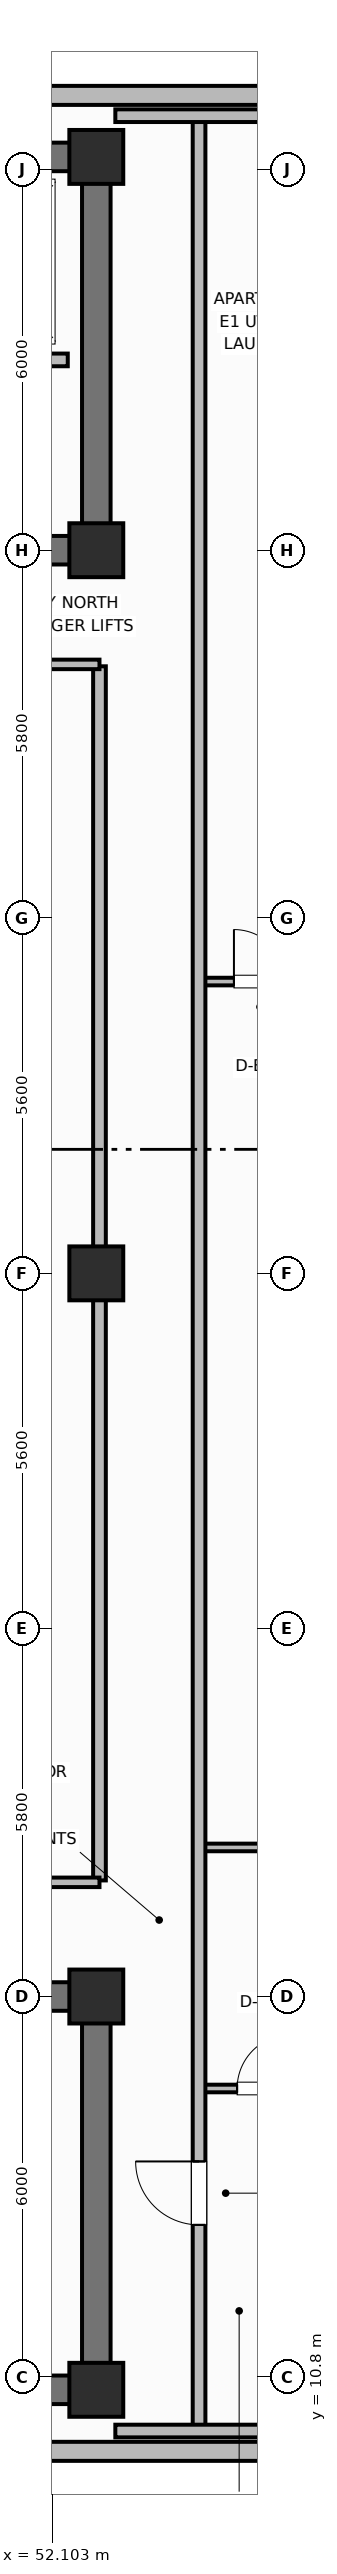
"""IFC4 building model, lengths in metres.
Left out: names, types, materials, properties, quantities, classifications, styles, units other than length and angle.
Written with IfcOpenShell. Run it as: python <this file> out.ifc"""

import sys

from ifc_helpers import new_model, si_unit, direction, frame, frame_2d, origin, origin_2d, place, context, subcontext, project, spatial, rectangle, extrude, element, fill, save


model = new_model("IFC4")
c1 = context("Model", 3, precision=1e-05, world=origin(), true_north=direction((0.0, 1.0)))
c2 = subcontext(c1, "Body", "Model", "MODEL_VIEW")
j1 = project(units=[si_unit("LENGTHUNIT", "METRE"), si_unit("PLANEANGLEUNIT", "RADIAN")], contexts=[c1])
p1 = place(None, origin())
s1 = spatial("IfcSite", under=j1, at=p1, CompositionType="ELEMENT")
p2 = place(p1, origin())
s2 = spatial("IfcBuilding", under=s1, at=p2, CompositionType="ELEMENT")
p3 = place(p2, frame((0.0, 0.0, 248.0)))
s3 = spatial("IfcBuildingStorey", under=s2, at=p3, CompositionType="ELEMENT", Elevation=248.0)
p4 = place(p3, frame((52.8, 10.6, 0.0), z_axis=(0.0, 0.0, 1.0), x_axis=(-1.0, 0.0, 0.0)))
e1 = element("IfcWall", 1, at=p4, inside=s3, PredefinedType="SHEAR", context=c2, shape_type="SweptSolid", body=[
    extrude(rectangle(XDim=27.2, YDim=0.45, at=frame_2d((13.6, 0.0))), origin(), (0.0, 0.0, 1.0), 3.7),
])
p5 = place(p3, frame((52.8, 10.825, 0.0), z_axis=(0.0, 0.0, 1.0), x_axis=(0.0, 1.0, 0.0)))
e2 = element("IfcWall", 2, at=p5, inside=s3, PredefinedType="SHEAR", context=c2, shape_type="SweptSolid", body=[
    extrude(rectangle(XDim=5.75, YDim=0.45, at=frame_2d((2.875, 0.0))), origin(), (0.0, 0.0, 1.0), 3.7),
])
p6 = place(p3, frame((25.6, 16.8, 0.0), z_axis=(0.0, 0.0, 1.0), x_axis=(1.0, 0.0, 0.0)))
e3 = element("IfcWall", 3, at=p6, inside=s3, PredefinedType="SHEAR", context=c2, shape_type="SweptSolid", body=[
    extrude(rectangle(XDim=27.2, YDim=0.45, at=frame_2d((13.6, 0.0))), origin(), (0.0, 0.0, 1.0), 3.7),
])
p7 = place(p6, frame((1.8, 0.0, 0.0)))
e4 = element("IfcOpeningElement", 4, at=p7, cuts=e3, PredefinedType="OPENING", context=c2, shape_type="SweptSolid", body=[
    extrude(rectangle(XDim=1.1, YDim=2.15, at=frame_2d((0.55, 1.075))), frame((0.0, 0.235, 0.0), z_axis=(0.0, -1.0, 0.0), x_axis=(1.0, 0.0, 0.0)), (0.0, 0.0, 1.0), 0.47),
])
p8 = place(p6, frame((5.6, 0.0, 0.0)))
e5 = element("IfcOpeningElement", 5, at=p8, cuts=e3, PredefinedType="OPENING", context=c2, shape_type="SweptSolid", body=[
    extrude(rectangle(XDim=0.85, YDim=2.1, at=frame_2d((0.425, 1.05))), frame((0.0, 0.235, 0.0), z_axis=(0.0, -1.0, 0.0), x_axis=(1.0, 0.0, 0.0)), (0.0, 0.0, 1.0), 0.47),
])
p9 = place(p6, frame((13.0, 0.0, 0.0)))
e6 = element("IfcOpeningElement", 6, at=p9, cuts=e3, PredefinedType="OPENING", context=c2, shape_type="SweptSolid", body=[
    extrude(rectangle(XDim=1.2, YDim=2.15, at=frame_2d((0.6, 1.075))), frame((0.0, 0.235, 0.0), z_axis=(0.0, -1.0, 0.0), x_axis=(1.0, 0.0, 0.0)), (0.0, 0.0, 1.0), 0.47),
])
p10 = place(p6, frame((19.2, 0.0, 0.0)))
e7 = element("IfcOpeningElement", 7, at=p10, cuts=e3, PredefinedType="OPENING", context=c2, shape_type="SweptSolid", body=[
    extrude(rectangle(XDim=0.85, YDim=2.1, at=frame_2d((0.425, 1.05))), frame((0.0, 0.235, 0.0), z_axis=(0.0, -1.0, 0.0), x_axis=(1.0, 0.0, 0.0)), (0.0, 0.0, 1.0), 0.47),
])
p11 = place(p6, frame((23.8, 0.0, 0.0)))
e8 = element("IfcOpeningElement", 8, at=p11, cuts=e3, PredefinedType="OPENING", context=c2, shape_type="SweptSolid", body=[
    extrude(rectangle(XDim=0.9, YDim=2.1, at=frame_2d((0.45, 1.05))), frame((0.0, 0.235, 0.0), z_axis=(0.0, -1.0, 0.0), x_axis=(1.0, 0.0, 0.0)), (0.0, 0.0, 1.0), 0.47),
])
p12 = place(p3, frame((25.6, 45.8, 0.0), z_axis=(0.0, 0.0, 1.0), x_axis=(1.0, 0.0, 0.0)))
e9 = element("IfcWall", 9, at=p12, inside=s3, PredefinedType="SHEAR", context=c2, shape_type="SweptSolid", body=[
    extrude(rectangle(XDim=27.2, YDim=0.45, at=frame_2d((13.6, 0.0))), origin(), (0.0, 0.0, 1.0), 3.7),
])
p13 = place(p3, frame((52.8, 39.825, 0.0), z_axis=(0.0, 0.0, 1.0), x_axis=(0.0, 1.0, 0.0)))
e10 = element("IfcWall", 10, at=p13, inside=s3, PredefinedType="SHEAR", context=c2, shape_type="SweptSolid", body=[
    extrude(rectangle(XDim=5.75, YDim=0.45, at=frame_2d((2.875, 0.0))), origin(), (0.0, 0.0, 1.0), 3.7),
])
p14 = place(p3, frame((52.8, 39.6, 0.0), z_axis=(0.0, 0.0, 1.0), x_axis=(-1.0, 0.0, 0.0)))
e11 = element("IfcWall", 11, at=p14, inside=s3, PredefinedType="SHEAR", context=c2, shape_type="SweptSolid", body=[
    extrude(rectangle(XDim=27.2, YDim=0.45, at=frame_2d((13.6, 0.0))), origin(), (0.0, 0.0, 1.0), 3.7),
])
p15 = place(p14, frame((24.2, 0.0, 0.0)))
e12 = element("IfcOpeningElement", 12, at=p15, cuts=e11, PredefinedType="OPENING", context=c2, shape_type="SweptSolid", body=[
    extrude(rectangle(XDim=1.1, YDim=2.15, at=frame_2d((0.55, 1.075))), frame((0.0, 0.235, 0.0), z_axis=(0.0, -1.0, 0.0), x_axis=(1.0, 0.0, 0.0)), (0.0, 0.0, 1.0), 0.47),
])
p16 = place(p14, frame((20.55, 0.0, 0.0)))
e13 = element("IfcOpeningElement", 13, at=p16, cuts=e11, PredefinedType="OPENING", context=c2, shape_type="SweptSolid", body=[
    extrude(rectangle(XDim=0.95, YDim=2.1, at=frame_2d((0.475, 1.05))), frame((0.0, 0.235, 0.0), z_axis=(0.0, -1.0, 0.0), x_axis=(1.0, 0.0, 0.0)), (0.0, 0.0, 1.0), 0.47),
])
p17 = place(p14, frame((15.1, 0.0, 0.0)))
e14 = element("IfcOpeningElement", 14, at=p17, cuts=e11, PredefinedType="OPENING", context=c2, shape_type="SweptSolid", body=[
    extrude(rectangle(XDim=1.2, YDim=2.15, at=frame_2d((0.6, 1.075))), frame((0.0, 0.235, 0.0), z_axis=(0.0, -1.0, 0.0), x_axis=(1.0, 0.0, 0.0)), (0.0, 0.0, 1.0), 0.47),
])
p18 = place(p14, frame((13.05, 0.0, 0.0)))
e15 = element("IfcOpeningElement", 15, at=p18, cuts=e11, PredefinedType="OPENING", context=c2, shape_type="SweptSolid", body=[
    extrude(rectangle(XDim=0.85, YDim=2.1, at=frame_2d((0.425, 1.05))), frame((0.0, 0.235, 0.0), z_axis=(0.0, -1.0, 0.0), x_axis=(1.0, 0.0, 0.0)), (0.0, 0.0, 1.0), 0.47),
])
p19 = place(p14, frame((11.0, 0.0, 0.0)))
e16 = element("IfcOpeningElement", 16, at=p19, cuts=e11, PredefinedType="OPENING", context=c2, shape_type="SweptSolid", body=[
    extrude(rectangle(XDim=0.85, YDim=2.1, at=frame_2d((0.425, 1.05))), frame((0.0, 0.235, 0.0), z_axis=(0.0, -1.0, 0.0), x_axis=(1.0, 0.0, 0.0)), (0.0, 0.0, 1.0), 0.47),
])
p20 = place(p14, frame((7.35, 0.0, 0.0)))
e17 = element("IfcOpeningElement", 17, at=p20, cuts=e11, PredefinedType="OPENING", context=c2, shape_type="SweptSolid", body=[
    extrude(rectangle(XDim=0.85, YDim=2.1, at=frame_2d((0.425, 1.05))), frame((0.0, 0.235, 0.0), z_axis=(0.0, -1.0, 0.0), x_axis=(1.0, 0.0, 0.0)), (0.0, 0.0, 1.0), 0.47),
])
p21 = place(p14, frame((4.2, 0.0, 0.0)))
e18 = element("IfcOpeningElement", 18, at=p21, cuts=e11, PredefinedType="OPENING", context=c2, shape_type="SweptSolid", body=[
    extrude(rectangle(XDim=1.3, YDim=2.2, at=frame_2d((0.65, 1.1))), frame((0.0, 0.235, 0.0), z_axis=(0.0, -1.0, 0.0), x_axis=(1.0, 0.0, 0.0)), (0.0, 0.0, 1.0), 0.47),
])
for number, where, z_axis, x_axis in (
    (19, (52.8, 10.6, 0.0), (0.0, 0.0, 1.0), (1.0, 0.0, 0.0)),
    (20, (52.8, 16.8, 0.0), (0.0, 0.0, 1.0), (1.0, 0.0, 0.0)),
    (21, (52.8, 39.6, 0.0), (0.0, 0.0, 1.0), (1.0, 0.0, 0.0)),
    (22, (52.8, 45.8, 0.0), (0.0, 0.0, 1.0), (1.0, 0.0, 0.0)),
    (23, (52.8, 28.2, 0.0), (0.0, 0.0, 1.0), (1.0, 0.0, 0.0)),
):
    element("IfcColumn", number, at=place(p3, frame(where, z_axis=z_axis, x_axis=x_axis)), inside=s3, PredefinedType="COLUMN", context=c2, shape_type="SweptSolid", body=[
        extrude(rectangle(XDim=0.85, YDim=0.85, at=origin_2d()), origin(), (0.0, 0.0, 1.0), 3.7),
    ])
p22 = place(p3, frame((22.56, 9.63, 0.0), z_axis=(0.0, 0.0, 1.0), x_axis=(1.0, 0.0, 0.0)))
e24 = element("IfcWall", 24, at=p22, inside=s3, PredefinedType="SOLIDWALL", context=c2, shape_type="SweptSolid", body=[
    extrude(rectangle(XDim=33.28, YDim=0.3, at=frame_2d((16.64, 0.0))), origin(), (0.0, 0.0, 1.0), 2.73),
])
p23 = place(p22, frame((4.311, 0.0, 0.76)))
e25 = element("IfcOpeningElement", 25, at=p23, cuts=e24, PredefinedType="OPENING", context=c2, shape_type="SweptSolid", body=[
    extrude(rectangle(XDim=1.4, YDim=1.85, at=frame_2d((0.7, 0.925))), frame((0.0, 0.16, 0.0), z_axis=(0.0, -1.0, 0.0), x_axis=(1.0, 0.0, 0.0)), (0.0, 0.0, 1.0), 0.32),
])
p24 = place(p22, frame((7.218, 0.0, 0.76)))
e26 = element("IfcOpeningElement", 26, at=p24, cuts=e24, PredefinedType="OPENING", context=c2, shape_type="SweptSolid", body=[
    extrude(rectangle(XDim=1.4, YDim=1.85, at=frame_2d((0.7, 0.925))), frame((0.0, 0.16, 0.0), z_axis=(0.0, -1.0, 0.0), x_axis=(1.0, 0.0, 0.0)), (0.0, 0.0, 1.0), 0.32),
])
p25 = place(p22, frame((9.775, 0.0, 0.76)))
e27 = element("IfcOpeningElement", 27, at=p25, cuts=e24, PredefinedType="OPENING", context=c2, shape_type="SweptSolid", body=[
    extrude(rectangle(XDim=1.4, YDim=1.85, at=frame_2d((0.7, 0.925))), frame((0.0, 0.16, 0.0), z_axis=(0.0, -1.0, 0.0), x_axis=(1.0, 0.0, 0.0)), (0.0, 0.0, 1.0), 0.32),
])
p26 = place(p22, frame((14.083, 0.0, 0.76)))
e28 = element("IfcOpeningElement", 28, at=p26, cuts=e24, PredefinedType="OPENING", context=c2, shape_type="SweptSolid", body=[
    extrude(rectangle(XDim=1.4, YDim=1.85, at=frame_2d((0.7, 0.925))), frame((0.0, 0.16, 0.0), z_axis=(0.0, -1.0, 0.0), x_axis=(1.0, 0.0, 0.0)), (0.0, 0.0, 1.0), 0.32),
])
p27 = place(p22, frame((15.94, 0.0, 0.76)))
e29 = element("IfcOpeningElement", 29, at=p27, cuts=e24, PredefinedType="OPENING", context=c2, shape_type="SweptSolid", body=[
    extrude(rectangle(XDim=1.4, YDim=1.85, at=frame_2d((0.7, 0.925))), frame((0.0, 0.16, 0.0), z_axis=(0.0, -1.0, 0.0), x_axis=(1.0, 0.0, 0.0)), (0.0, 0.0, 1.0), 0.32),
])
p28 = place(p22, frame((17.797, 0.0, 0.76)))
e30 = element("IfcOpeningElement", 30, at=p28, cuts=e24, PredefinedType="OPENING", context=c2, shape_type="SweptSolid", body=[
    extrude(rectangle(XDim=1.4, YDim=1.85, at=frame_2d((0.7, 0.925))), frame((0.0, 0.16, 0.0), z_axis=(0.0, -1.0, 0.0), x_axis=(1.0, 0.0, 0.0)), (0.0, 0.0, 1.0), 0.32),
])
p29 = place(p22, frame((22.104, 0.0, 0.76)))
e31 = element("IfcOpeningElement", 31, at=p29, cuts=e24, PredefinedType="OPENING", context=c2, shape_type="SweptSolid", body=[
    extrude(rectangle(XDim=1.4, YDim=1.85, at=frame_2d((0.7, 0.925))), frame((0.0, 0.16, 0.0), z_axis=(0.0, -1.0, 0.0), x_axis=(1.0, 0.0, 0.0)), (0.0, 0.0, 1.0), 0.32),
])
p30 = place(p22, frame((24.662, 0.0, 0.76)))
e32 = element("IfcOpeningElement", 32, at=p30, cuts=e24, PredefinedType="OPENING", context=c2, shape_type="SweptSolid", body=[
    extrude(rectangle(XDim=1.4, YDim=1.85, at=frame_2d((0.7, 0.925))), frame((0.0, 0.16, 0.0), z_axis=(0.0, -1.0, 0.0), x_axis=(1.0, 0.0, 0.0)), (0.0, 0.0, 1.0), 0.32),
])
p31 = place(p22, frame((27.569, 0.0, 0.76)))
e33 = element("IfcOpeningElement", 33, at=p31, cuts=e24, PredefinedType="OPENING", context=c2, shape_type="SweptSolid", body=[
    extrude(rectangle(XDim=1.4, YDim=1.85, at=frame_2d((0.7, 0.925))), frame((0.0, 0.16, 0.0), z_axis=(0.0, -1.0, 0.0), x_axis=(1.0, 0.0, 0.0)), (0.0, 0.0, 1.0), 0.32),
])
p32 = place(p3, frame((55.84, 46.77, 0.0), z_axis=(0.0, 0.0, 1.0), x_axis=(-1.0, 0.0, 0.0)))
e34 = element("IfcWall", 34, at=p32, inside=s3, PredefinedType="SOLIDWALL", context=c2, shape_type="SweptSolid", body=[
    extrude(rectangle(XDim=33.28, YDim=0.3, at=frame_2d((16.64, 0.0))), origin(), (0.0, 0.0, 1.0), 2.73),
])
p33 = place(p32, frame((4.547, 0.0, 0.76)))
e35 = element("IfcOpeningElement", 35, at=p33, cuts=e34, PredefinedType="OPENING", context=c2, shape_type="SweptSolid", body=[
    extrude(rectangle(XDim=1.8, YDim=1.85, at=frame_2d((0.9, 0.925))), frame((0.0, 0.16, 0.0), z_axis=(0.0, -1.0, 0.0), x_axis=(1.0, 0.0, 0.0)), (0.0, 0.0, 1.0), 0.32),
])
p34 = place(p32, frame((7.745, 0.0, 0.76)))
e36 = element("IfcOpeningElement", 36, at=p34, cuts=e34, PredefinedType="OPENING", context=c2, shape_type="SweptSolid", body=[
    extrude(rectangle(XDim=1.8, YDim=1.85, at=frame_2d((0.9, 0.925))), frame((0.0, 0.16, 0.0), z_axis=(0.0, -1.0, 0.0), x_axis=(1.0, 0.0, 0.0)), (0.0, 0.0, 1.0), 0.32),
])
p35 = place(p32, frame((14.141, 0.0, 0.76)))
e37 = element("IfcOpeningElement", 37, at=p35, cuts=e34, PredefinedType="OPENING", context=c2, shape_type="SweptSolid", body=[
    extrude(rectangle(XDim=1.8, YDim=1.85, at=frame_2d((0.9, 0.925))), frame((0.0, 0.16, 0.0), z_axis=(0.0, -1.0, 0.0), x_axis=(1.0, 0.0, 0.0)), (0.0, 0.0, 1.0), 0.32),
])
p36 = place(p32, frame((17.339, 0.0, 0.76)))
e38 = element("IfcOpeningElement", 38, at=p36, cuts=e34, PredefinedType="OPENING", context=c2, shape_type="SweptSolid", body=[
    extrude(rectangle(XDim=1.8, YDim=1.85, at=frame_2d((0.9, 0.925))), frame((0.0, 0.16, 0.0), z_axis=(0.0, -1.0, 0.0), x_axis=(1.0, 0.0, 0.0)), (0.0, 0.0, 1.0), 0.32),
])
p37 = place(p32, frame((23.735, 0.0, 0.76)))
e39 = element("IfcOpeningElement", 39, at=p37, cuts=e34, PredefinedType="OPENING", context=c2, shape_type="SweptSolid", body=[
    extrude(rectangle(XDim=1.8, YDim=1.85, at=frame_2d((0.9, 0.925))), frame((0.0, 0.16, 0.0), z_axis=(0.0, -1.0, 0.0), x_axis=(1.0, 0.0, 0.0)), (0.0, 0.0, 1.0), 0.32),
])
p38 = place(p32, frame((26.933, 0.0, 0.76)))
e40 = element("IfcOpeningElement", 40, at=p38, cuts=e34, PredefinedType="OPENING", context=c2, shape_type="SweptSolid", body=[
    extrude(rectangle(XDim=1.8, YDim=1.85, at=frame_2d((0.9, 0.925))), frame((0.0, 0.16, 0.0), z_axis=(0.0, -1.0, 0.0), x_axis=(1.0, 0.0, 0.0)), (0.0, 0.0, 1.0), 0.32),
])
p39 = place(p3, frame((52.35, 42.6, 0.0), z_axis=(0.0, 0.0, 1.0), x_axis=(-1.0, 0.0, 0.0)))
e41 = element("IfcWall", 41, at=p39, inside=s3, PredefinedType="PARTITIONING", context=c2, shape_type="SweptSolid", body=[
    extrude(rectangle(XDim=6.5, YDim=0.2, at=frame_2d((3.25, 0.0))), origin(), (0.0, 0.0, 1.0), 2.56),
])
p40 = place(p39, frame((4.9, 0.0, 0.0)))
e42 = element("IfcOpeningElement", 42, at=p40, cuts=e41, PredefinedType="OPENING", context=c2, shape_type="SweptSolid", body=[
    extrude(rectangle(XDim=1.0, YDim=2.15, at=frame_2d((0.5, 1.075))), frame((0.0, 0.11, 0.0), z_axis=(0.0, -1.0, 0.0), x_axis=(1.0, 0.0, 0.0)), (0.0, 0.0, 1.0), 0.22),
])
p41 = place(p39, frame((2.8, 0.0, 0.0)))
e43 = element("IfcOpeningElement", 43, at=p41, cuts=e41, PredefinedType="OPENING", context=c2, shape_type="SweptSolid", body=[
    extrude(rectangle(XDim=1.0, YDim=2.15, at=frame_2d((0.5, 1.075))), frame((0.0, 0.11, 0.0), z_axis=(0.0, -1.0, 0.0), x_axis=(1.0, 0.0, 0.0)), (0.0, 0.0, 1.0), 0.22),
])
p42 = place(p39, frame((0.7, 0.0, 0.0)))
e44 = element("IfcOpeningElement", 44, at=p42, cuts=e41, PredefinedType="OPENING", context=c2, shape_type="SweptSolid", body=[
    extrude(rectangle(XDim=1.0, YDim=2.15, at=frame_2d((0.5, 1.075))), frame((0.0, 0.11, 0.0), z_axis=(0.0, -1.0, 0.0), x_axis=(1.0, 0.0, 0.0)), (0.0, 0.0, 1.0), 0.22),
])
p43 = place(p3, frame((52.85, 18.63, 0.0), z_axis=(0.0, 0.0, 1.0), x_axis=(0.0, 1.0, 0.0)))
e45 = element("IfcWall", 45, at=p43, inside=s3, PredefinedType="PARTITIONING", context=c2, shape_type="SweptSolid", body=[
    extrude(rectangle(XDim=19.14, YDim=0.2, at=frame_2d((9.57, 0.0))), origin(), (0.0, 0.0, 1.0), 2.56),
])
for number, where, z_axis, x_axis in (
    (46, (30.7, 18.6, 0.0), (0.0, 0.0, 1.0), (1.0, 0.0, 0.0)),
    (47, (30.7, 37.8, 0.0), (0.0, 0.0, 1.0), (1.0, 0.0, 0.0)),
):
    element("IfcWall", number, at=place(p3, frame(where, z_axis=z_axis, x_axis=x_axis)), inside=s3, PredefinedType="PARTITIONING", context=c2, shape_type="SweptSolid", body=[
        extrude(rectangle(XDim=22.15, YDim=0.15, at=frame_2d((11.075, 0.0))), origin(), (0.0, 0.0, 1.0), 2.56),
    ])
p44 = place(p3, frame((54.42, 15.35, 0.0), z_axis=(0.0, 0.0, 1.0), x_axis=(1.0, 0.0, 0.0)))
e48 = element("IfcWall", 48, at=p44, inside=s3, PredefinedType="PARTITIONING", context=c2, shape_type="SweptSolid", body=[
    extrude(rectangle(XDim=1.95, YDim=0.12, at=frame_2d((0.975, 0.0))), origin(), (0.0, 0.0, 1.0), 2.56),
])
p45 = place(p44, frame((0.6, 0.0, 0.0)))
e49 = element("IfcOpeningElement", 49, at=p45, cuts=e48, PredefinedType="OPENING", context=c2, shape_type="SweptSolid", body=[
    extrude(rectangle(XDim=0.85, YDim=2.1, at=frame_2d((0.425, 1.05))), frame((0.0, 0.07, 0.0), z_axis=(0.0, -1.0, 0.0), x_axis=(1.0, 0.0, 0.0)), (0.0, 0.0, 1.0), 0.14),
])
p46 = place(p3, frame((54.42, 19.15, 0.0), z_axis=(0.0, 0.0, 1.0), x_axis=(1.0, 0.0, 0.0)))
e50 = element("IfcWall", 50, at=p46, inside=s3, PredefinedType="PARTITIONING", context=c2, shape_type="SweptSolid", body=[
    extrude(rectangle(XDim=1.95, YDim=0.12, at=frame_2d((0.975, 0.0))), origin(), (0.0, 0.0, 1.0), 2.56),
])
p47 = place(p3, frame((54.42, 32.8, 0.0), z_axis=(0.0, 0.0, 1.0), x_axis=(1.0, 0.0, 0.0)))
e51 = element("IfcWall", 51, at=p47, inside=s3, PredefinedType="PARTITIONING", context=c2, shape_type="SweptSolid", body=[
    extrude(rectangle(XDim=1.95, YDim=0.12, at=frame_2d((0.975, 0.0))), origin(), (0.0, 0.0, 1.0), 2.56),
])
p48 = place(p47, frame((0.55, 0.0, 0.0)))
e52 = element("IfcOpeningElement", 52, at=p48, cuts=e51, PredefinedType="OPENING", context=c2, shape_type="SweptSolid", body=[
    extrude(rectangle(XDim=0.82, YDim=2.08, at=frame_2d((0.41, 1.04))), frame((0.0, 0.07, 0.0), z_axis=(0.0, -1.0, 0.0), x_axis=(1.0, 0.0, 0.0)), (0.0, 0.0, 1.0), 0.14),
])
p49 = place(p3, frame((54.42, 9.95, 0.0), z_axis=(0.0, 0.0, 1.0), x_axis=(0.0, 1.0, 0.0)))
e53 = element("IfcWall", 53, at=p49, inside=s3, PredefinedType="PARTITIONING", context=c2, shape_type="SweptSolid", body=[
    extrude(rectangle(XDim=36.5, YDim=0.2, at=frame_2d((18.25, 0.0))), origin(), (0.0, 0.0, 1.0), 2.56),
])
p50 = place(p49, frame((3.25, 0.0, 0.0)))
e54 = element("IfcOpeningElement", 54, at=p50, cuts=e53, PredefinedType="OPENING", context=c2, shape_type="SweptSolid", body=[
    extrude(rectangle(XDim=1.0, YDim=2.15, at=frame_2d((0.5, 1.075))), frame((0.0, 0.11, 0.0), z_axis=(0.0, -1.0, 0.0), x_axis=(1.0, 0.0, 0.0)), (0.0, 0.0, 1.0), 0.22),
])
for number, where, z_axis, x_axis in (
    (55, (53.1, 9.95, 0.0), (0.0, 0.0, 1.0), (1.0, 0.0, 0.0)),
    (56, (53.1, 46.45, 0.0), (0.0, 0.0, 1.0), (1.0, 0.0, 0.0)),
):
    element("IfcWall", number, at=place(p3, frame(where, z_axis=z_axis, x_axis=x_axis)), inside=s3, PredefinedType="PARTITIONING", context=c2, shape_type="SweptSolid", body=[
        extrude(rectangle(XDim=3.754, YDim=0.2, at=frame_2d((1.877, 0.0))), origin(), (0.0, 0.0, 1.0), 2.56),
    ])
p51 = place(p45, origin())
e57 = element("IfcDoor", 57, at=p51, inside=s3, OperationType="SINGLE_SWING_RIGHT", PredefinedType="DOOR", context=c2, shape_type="SweptSolid", body=[
    extrude(rectangle(XDim=0.85, YDim=2.1, at=frame_2d((0.425, 1.05))), frame((0.0, 0.025, 0.0), z_axis=(0.0, -1.0, 0.0), x_axis=(1.0, 0.0, 0.0)), (0.0, 0.0, 1.0), 0.05),
])
fill(e49, e57)
p52 = place(p48, origin())
e58 = element("IfcDoor", 58, at=p52, inside=s3, OperationType="SINGLE_SWING_LEFT", PredefinedType="DOOR", context=c2, shape_type="SweptSolid", body=[
    extrude(rectangle(XDim=0.82, YDim=2.08, at=frame_2d((0.41, 1.04))), frame((0.0, 0.025, 0.0), z_axis=(0.0, -1.0, 0.0), x_axis=(1.0, 0.0, 0.0)), (0.0, 0.0, 1.0), 0.05),
])
fill(e52, e58)
p53 = place(p50, origin())
e59 = element("IfcDoor", 59, at=p53, inside=s3, OperationType="SINGLE_SWING_RIGHT", PredefinedType="DOOR", context=c2, shape_type="SweptSolid", body=[
    extrude(rectangle(XDim=1.0, YDim=2.15, at=frame_2d((0.5, 1.075))), frame((0.0, 0.025, 0.0), z_axis=(0.0, -1.0, 0.0), x_axis=(1.0, 0.0, 0.0)), (0.0, 0.0, 1.0), 0.05),
])
fill(e54, e59)
save(model, sys.argv[1])
